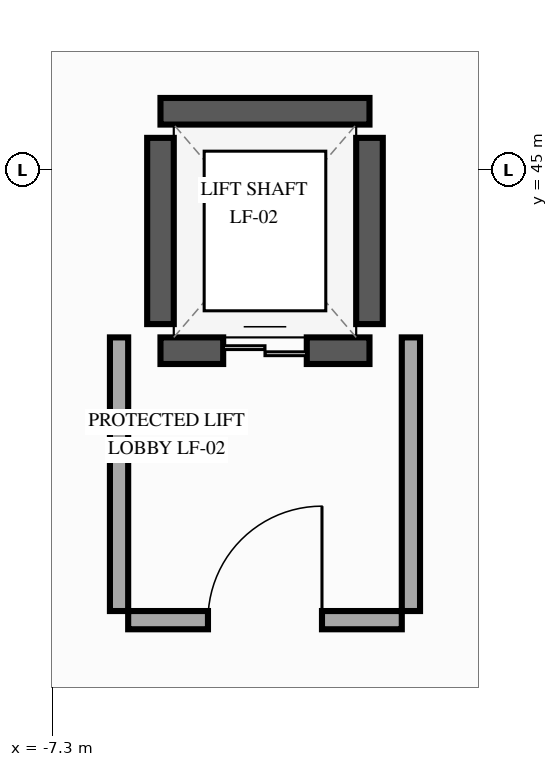
"""IFC4 building model, lengths in metres.
Left out: names, types, materials, properties, quantities, classifications, styles, units other than length and angle.
Written with IfcOpenShell. Run it as: python <this file> out.ifc"""

import sys

from ifc_helpers import new_model, si_unit, direction, frame, frame_2d, origin, place, context, subcontext, project, spatial, rectangle, extrude, element, fill, save


model = new_model("IFC4")
c1 = context("Model", 3, precision=1e-05, world=origin(), true_north=direction((0.0, 1.0)))
c2 = subcontext(c1, "Body", "Model", "MODEL_VIEW")
j1 = project(units=[si_unit("LENGTHUNIT", "METRE"), si_unit("PLANEANGLEUNIT", "RADIAN")], contexts=[c1])
p1 = place(None, origin())
s1 = spatial("IfcSite", under=j1, at=p1, CompositionType="ELEMENT")
p2 = place(p1, origin())
s2 = spatial("IfcBuilding", under=s1, at=p2, CompositionType="ELEMENT")
p3 = place(p2, frame((0.0, 0.0, -6.0)))
s3 = spatial("IfcBuildingStorey", under=s2, at=p3, CompositionType="ELEMENT", Elevation=-6.0)
p4 = place(p3, frame((-5.875, 42.625, 0.0), z_axis=(0.0, 0.0, 1.0), x_axis=(1.0, 0.0, 0.0)))
e1 = element("IfcWall", 1, at=p4, inside=s3, PredefinedType="SHEAR", context=c2, shape_type="SweptSolid", body=[
    extrude(rectangle(XDim=2.75, YDim=0.35, at=frame_2d((1.375, 0.0))), origin(), (0.0, 0.0, 1.0), 5.7),
])
p5 = place(p4, frame((0.825, 0.0, 0.0)))
e2 = element("IfcOpeningElement", 2, at=p5, cuts=e1, PredefinedType="OPENING", context=c2, shape_type="SweptSolid", body=[
    extrude(rectangle(XDim=1.1, YDim=2.2, at=frame_2d((0.55, 1.1))), frame((0.0, 0.185, 0.0), z_axis=(0.0, -1.0, 0.0), x_axis=(1.0, 0.0, 0.0)), (0.0, 0.0, 1.0), 0.37),
])
p6 = place(p3, frame((-3.125, 45.775, 0.0), z_axis=(0.0, 0.0, 1.0), x_axis=(-1.0, 0.0, 0.0)))
e3 = element("IfcWall", 3, at=p6, inside=s3, PredefinedType="SHEAR", context=c2, shape_type="SweptSolid", body=[
    extrude(rectangle(XDim=2.75, YDim=0.35, at=frame_2d((1.375, 0.0))), origin(), (0.0, 0.0, 1.0), 5.7),
])
for number, where, z_axis, x_axis in (
    (4, (-5.875, 42.975, 0.0), (0.0, 0.0, 1.0), (0.0, 1.0, 0.0)),
    (5, (-3.125, 42.975, 0.0), (0.0, 0.0, 1.0), (0.0, 1.0, 0.0)),
):
    element("IfcWall", number, at=place(p3, frame(where, z_axis=z_axis, x_axis=x_axis)), inside=s3, PredefinedType="SHEAR", context=c2, shape_type="SweptSolid", body=[
        extrude(rectangle(XDim=2.45, YDim=0.35, at=frame_2d((1.225, 0.0))), origin(), (0.0, 0.0, 1.0), 5.7),
    ])
p7 = place(p3, frame((-6.3, 39.08, 0.0), z_axis=(0.0, 0.0, 1.0), x_axis=(1.0, 0.0, 0.0)))
e6 = element("IfcWall", 6, at=p7, inside=s3, PredefinedType="PARTITIONING", context=c2, shape_type="SweptSolid", body=[
    extrude(rectangle(XDim=3.6, YDim=0.24, at=frame_2d((1.8, 0.0))), origin(), (0.0, 0.0, 1.0), 5.185),
])
p8 = place(p7, frame((1.05, 0.0, 0.0)))
e7 = element("IfcOpeningElement", 7, at=p8, cuts=e6, PredefinedType="OPENING", context=c2, shape_type="SweptSolid", body=[
    extrude(rectangle(XDim=1.5, YDim=2.2, at=frame_2d((0.75, 1.1))), frame((0.0, 0.13, 0.0), z_axis=(0.0, -1.0, 0.0), x_axis=(1.0, 0.0, 0.0)), (0.0, 0.0, 1.0), 0.26),
])
for number, where, z_axis, x_axis in (
    (8, (-6.42, 39.2, 0.0), (0.0, 0.0, 1.0), (0.0, 1.0, 0.0)),
    (9, (-2.58, 39.2, 0.0), (0.0, 0.0, 1.0), (0.0, 1.0, 0.0)),
):
    element("IfcWall", number, at=place(p3, frame(where, z_axis=z_axis, x_axis=x_axis)), inside=s3, PredefinedType="PARTITIONING", context=c2, shape_type="SweptSolid", body=[
        extrude(rectangle(XDim=3.6, YDim=0.24, at=frame_2d((1.8, 0.0))), origin(), (0.0, 0.0, 1.0), 5.185),
    ])
p9 = place(p5, origin())
e10 = element("IfcDoor", 10, at=p9, inside=s3, OperationType="DOUBLE_DOOR_SLIDING", PredefinedType="DOOR", context=c2, shape_type="SweptSolid", body=[
    extrude(rectangle(XDim=1.1, YDim=2.2, at=frame_2d((0.55, 1.1))), frame((0.0, 0.025, 0.0), z_axis=(0.0, -1.0, 0.0), x_axis=(1.0, 0.0, 0.0)), (0.0, 0.0, 1.0), 0.05),
])
fill(e2, e10)
p10 = place(p8, origin())
e11 = element("IfcDoor", 11, at=p10, inside=s3, OperationType="SINGLE_SWING_RIGHT", PredefinedType="DOOR", context=c2, shape_type="SweptSolid", body=[
    extrude(rectangle(XDim=1.5, YDim=2.2, at=frame_2d((0.75, 1.1))), frame((0.0, 0.025, 0.0), z_axis=(0.0, -1.0, 0.0), x_axis=(1.0, 0.0, 0.0)), (0.0, 0.0, 1.0), 0.05),
])
fill(e7, e11)
save(model, sys.argv[1])
